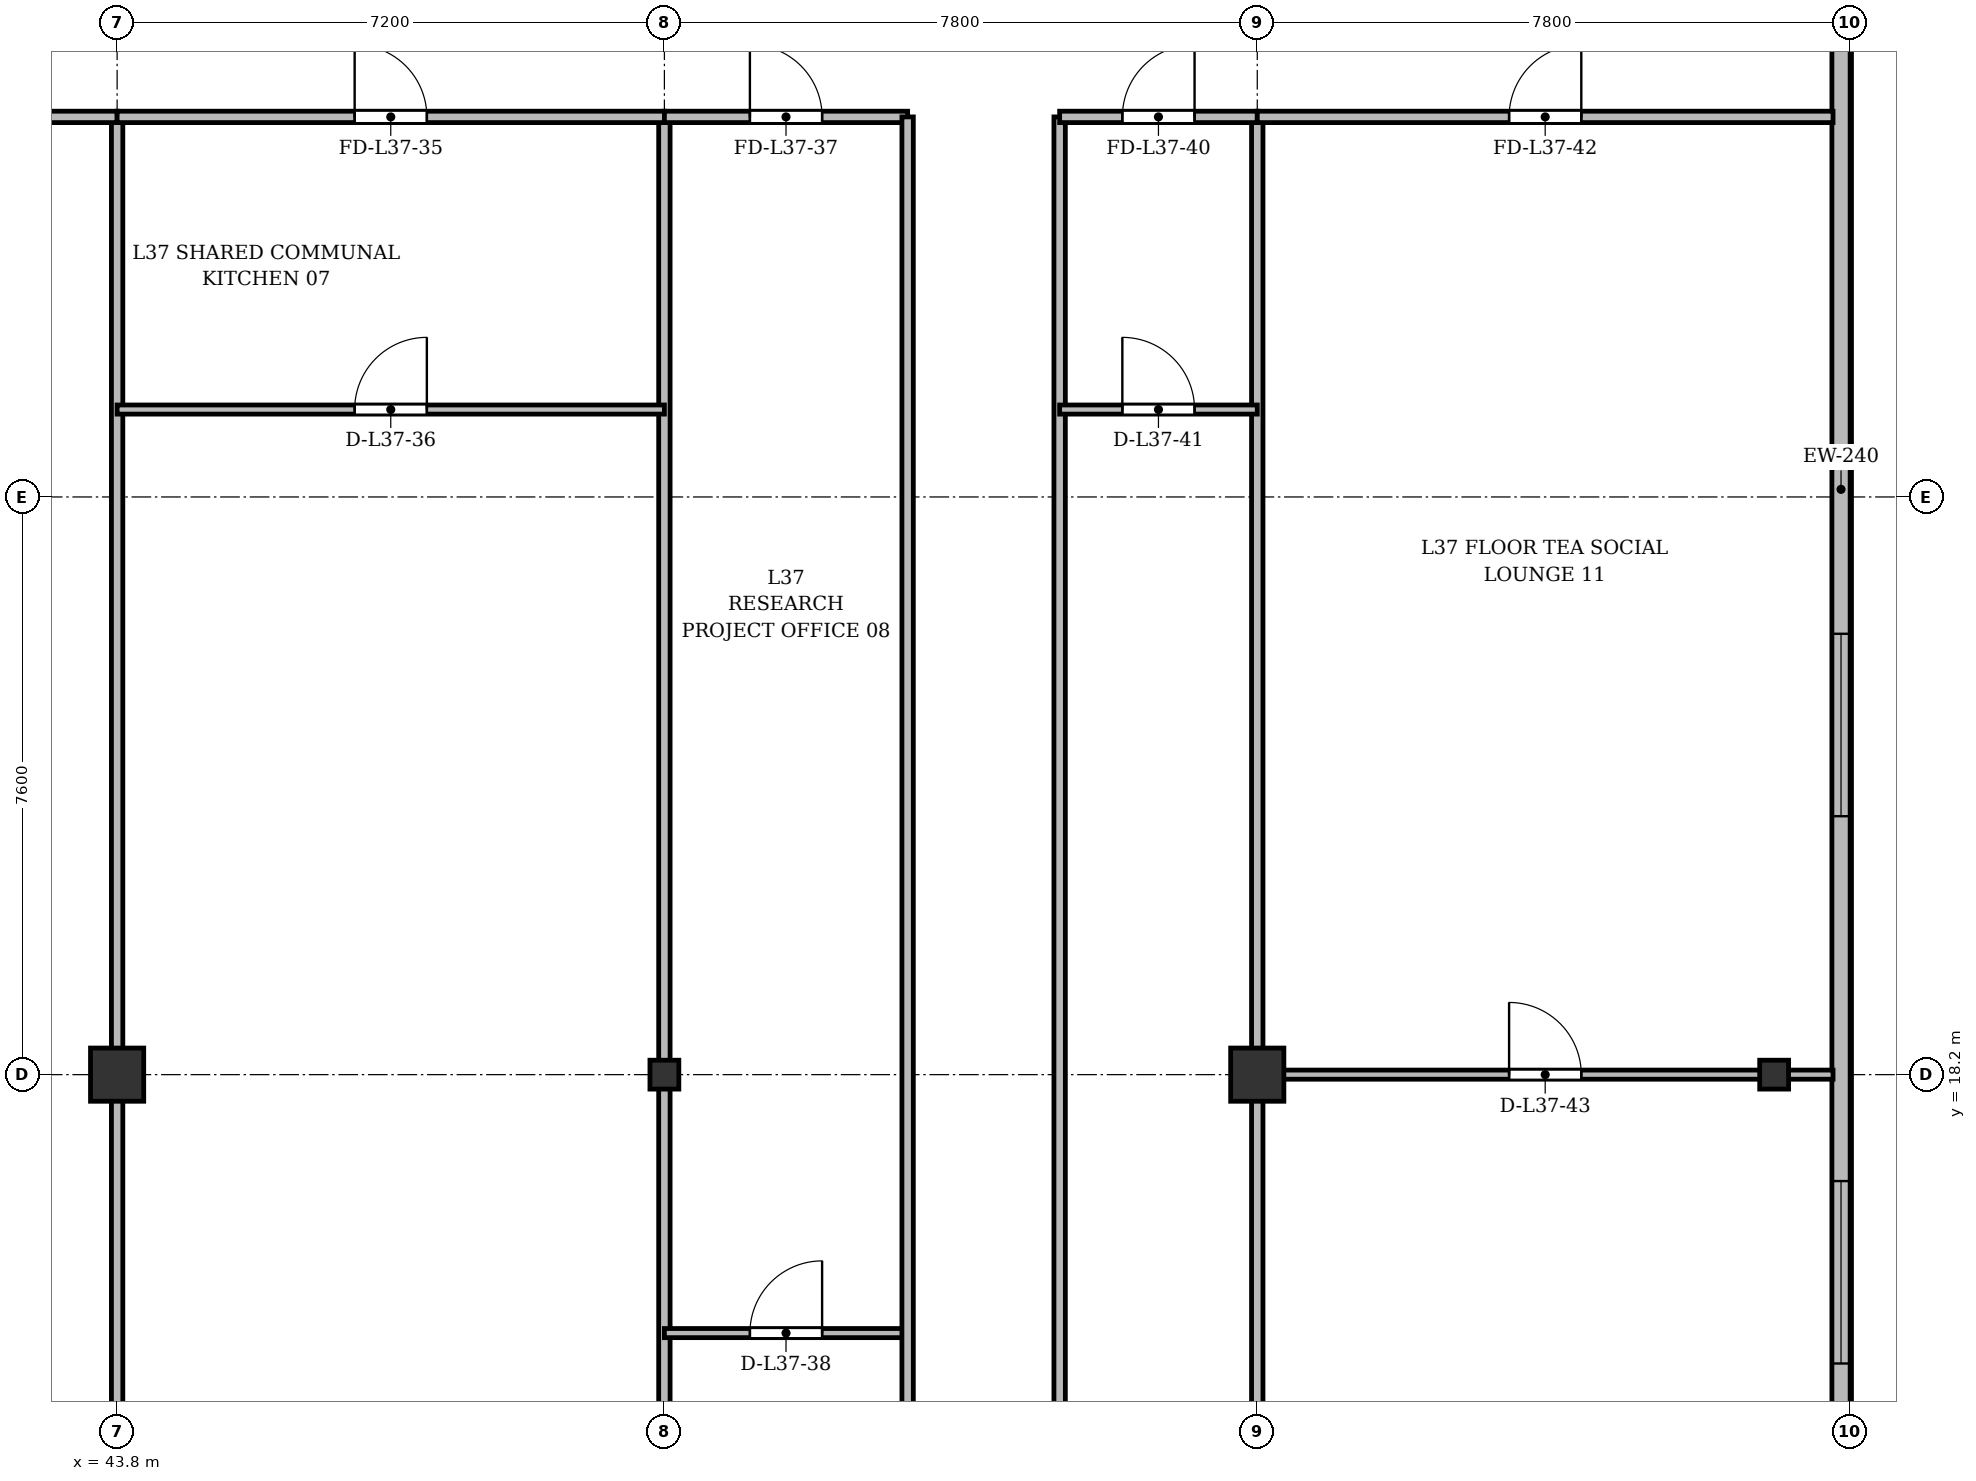
"""IFC4 building model, lengths in metres.
Left out: names, types, materials, properties, quantities, classifications, styles, units other than length and angle.
Written with IfcOpenShell. Run it as: python <this file> out.ifc"""

import sys

from ifc_helpers import new_model, si_unit, direction, frame, frame_2d, origin, origin_2d, place, context, subcontext, project, spatial, rectangle, i_section, extrude, source, transform, mapped, element, fill, save


model = new_model("IFC4")
c1 = context("Model", 3, precision=1e-05, world=origin(), true_north=direction((0.0, 1.0)))
c2 = subcontext(c1, "Body", "Model", "MODEL_VIEW")
j1 = project(units=[si_unit("LENGTHUNIT", "METRE"), si_unit("PLANEANGLEUNIT", "RADIAN")], contexts=[c1])
p1 = place(None, origin())
s1 = spatial("IfcSite", under=j1, at=p1, CompositionType="ELEMENT")
p2 = place(p1, origin())
s2 = spatial("IfcBuilding", under=s1, at=p2, CompositionType="ELEMENT")
p3 = place(p2, frame((0.0, 0.0, 142.9)))
s3 = spatial("IfcBuildingStorey", under=s2, at=p3, CompositionType="ELEMENT", Elevation=142.9)
m1 = source(origin(), c2, "Body", "SweptSolid", [
    extrude(rectangle(XDim=0.7, YDim=0.7, at=origin_2d()), origin(), (0.0, 0.0, 1.0), 3.6),
])
p4 = place(p3, frame((43.8, 18.2, 0.0), z_axis=(0.0, 0.0, 1.0), x_axis=(1.0, 0.0, 0.0)))
e1 = element("IfcColumn", 1, at=p4, inside=s3, PredefinedType="COLUMN", context=c2, shape_type="MappedRepresentation", body=[
    mapped(m1, transform((0.0, 0.0, 0.0), x_axis=(1.0, 0.0, 0.0), y_axis=(0.0, 1.0, 0.0), z_axis=(0.0, 0.0, 1.0), scale=1.0)),
])
m2 = source(origin(), c2, "Body", "SweptSolid", [
    extrude(i_section(OverallWidth=0.38, OverallDepth=0.38, WebThickness=0.02, FlangeThickness=0.03, at=origin_2d()), origin(), (0.0, 0.0, 1.0), 3.6),
])
p5 = place(p3, frame((51.0, 18.2, 0.0), z_axis=(0.0, 0.0, 1.0), x_axis=(1.0, 0.0, 0.0)))
e2 = element("IfcColumn", 2, at=p5, inside=s3, PredefinedType="COLUMN", context=c2, shape_type="MappedRepresentation", body=[
    mapped(m2, transform((0.0, 0.0, 0.0), x_axis=(1.0, 0.0, 0.0), y_axis=(0.0, 1.0, 0.0), z_axis=(0.0, 0.0, 1.0), scale=1.0)),
])
p6 = place(p3, frame((58.8, 18.2, 0.0), z_axis=(0.0, 0.0, 1.0), x_axis=(1.0, 0.0, 0.0)))
e3 = element("IfcColumn", 3, at=p6, inside=s3, PredefinedType="COLUMN", context=c2, shape_type="MappedRepresentation", body=[
    mapped(m1, transform((0.0, 0.0, 0.0), x_axis=(1.0, 0.0, 0.0), y_axis=(0.0, 1.0, 0.0), z_axis=(0.0, 0.0, 1.0), scale=1.0)),
])
p7 = place(p3, frame((65.6, 18.2, 0.0), z_axis=(0.0, 0.0, 1.0), x_axis=(1.0, 0.0, 0.0)))
e4 = element("IfcColumn", 4, at=p7, inside=s3, PredefinedType="COLUMN", context=c2, shape_type="MappedRepresentation", body=[
    mapped(m2, transform((0.0, 0.0, 0.0), x_axis=(1.0, 0.0, 0.0), y_axis=(0.0, 1.0, 0.0), z_axis=(0.0, 0.0, 1.0), scale=1.0)),
])
p8 = place(p3, frame((66.48, 45.5, 0.0), z_axis=(0.0, 0.0, 1.0), x_axis=(0.0, -1.0, 0.0)))
e5 = element("IfcWall", 5, at=p8, inside=s3, PredefinedType="SOLIDWALL", context=c2, shape_type="SweptSolid", body=[
    extrude(rectangle(XDim=39.2, YDim=0.24, at=frame_2d((19.6, 0.0))), origin(), (0.0, 0.0, 1.0), 3.35),
])
p9 = place(p8, frame((36.55, 0.0, 0.92)))
e6 = element("IfcOpeningElement", 6, at=p9, cuts=e5, PredefinedType="OPENING", context=c2, shape_type="SweptSolid", body=[
    extrude(rectangle(XDim=1.2, YDim=1.65, at=frame_2d((0.6, 0.825))), frame((0.0, 0.13, 0.0), z_axis=(0.0, -1.0, 0.0), x_axis=(1.0, 0.0, 0.0)), (0.0, 0.0, 1.0), 0.26),
])
p10 = place(p8, frame((32.9, 0.0, 0.92)))
e7 = element("IfcOpeningElement", 7, at=p10, cuts=e5, PredefinedType="OPENING", context=c2, shape_type="SweptSolid", body=[
    extrude(rectangle(XDim=2.4, YDim=2.1, at=frame_2d((1.2, 1.05))), frame((0.0, 0.13, 0.0), z_axis=(0.0, -1.0, 0.0), x_axis=(1.0, 0.0, 0.0)), (0.0, 0.0, 1.0), 0.26),
])
p11 = place(p8, frame((28.7, 0.0, 0.92)))
e8 = element("IfcOpeningElement", 8, at=p11, cuts=e5, PredefinedType="OPENING", context=c2, shape_type="SweptSolid", body=[
    extrude(rectangle(XDim=2.4, YDim=2.1, at=frame_2d((1.2, 1.05))), frame((0.0, 0.13, 0.0), z_axis=(0.0, -1.0, 0.0), x_axis=(1.0, 0.0, 0.0)), (0.0, 0.0, 1.0), 0.26),
])
p12 = place(p8, frame((21.5, 0.0, 0.92)))
e9 = element("IfcOpeningElement", 9, at=p12, cuts=e5, PredefinedType="OPENING", context=c2, shape_type="SweptSolid", body=[
    extrude(rectangle(XDim=2.4, YDim=2.1, at=frame_2d((1.2, 1.05))), frame((0.0, 0.13, 0.0), z_axis=(0.0, -1.0, 0.0), x_axis=(1.0, 0.0, 0.0)), (0.0, 0.0, 1.0), 0.26),
])
p13 = place(p8, frame((7.5, 0.0, 0.92)))
e10 = element("IfcOpeningElement", 10, at=p13, cuts=e5, PredefinedType="OPENING", context=c2, shape_type="SweptSolid", body=[
    extrude(rectangle(XDim=2.4, YDim=2.1, at=frame_2d((1.2, 1.05))), frame((0.0, 0.13, 0.0), z_axis=(0.0, -1.0, 0.0), x_axis=(1.0, 0.0, 0.0)), (0.0, 0.0, 1.0), 0.26),
])
p14 = place(p8, frame((4.5, 0.0, 0.92)))
e11 = element("IfcOpeningElement", 11, at=p14, cuts=e5, PredefinedType="OPENING", context=c2, shape_type="SweptSolid", body=[
    extrude(rectangle(XDim=1.2, YDim=1.65, at=frame_2d((0.6, 0.825))), frame((0.0, 0.13, 0.0), z_axis=(0.0, -1.0, 0.0), x_axis=(1.0, 0.0, 0.0)), (0.0, 0.0, 1.0), 0.26),
])
p15 = place(p8, frame((1.15, 0.0, 0.92)))
e12 = element("IfcOpeningElement", 12, at=p15, cuts=e5, PredefinedType="OPENING", context=c2, shape_type="SweptSolid", body=[
    extrude(rectangle(XDim=1.2, YDim=1.65, at=frame_2d((0.6, 0.825))), frame((0.0, 0.13, 0.0), z_axis=(0.0, -1.0, 0.0), x_axis=(1.0, 0.0, 0.0)), (0.0, 0.0, 1.0), 0.26),
])
for number, where, z_axis, x_axis in (
    (13, (43.8, 3.525, 0.0), (0.0, 0.0, 1.0), (0.0, 1.0, 0.0)),
    (14, (51.0, 3.525, 0.0), (0.0, 0.0, 1.0), (0.0, 1.0, 0.0)),
    (15, (58.8, 3.525, 0.0), (0.0, 0.0, 1.0), (0.0, 1.0, 0.0)),
):
    element("IfcWall", number, at=place(p3, frame(where, z_axis=z_axis, x_axis=x_axis)), inside=s3, PredefinedType="PARTITIONING", context=c2, shape_type="SweptSolid", body=[
        extrude(rectangle(XDim=27.275, YDim=0.15, at=frame_2d((13.638, 0.0))), origin(), (0.0, 0.0, 1.0), 2.85),
    ])
p16 = place(p3, frame((30.6, 30.8, 0.0), z_axis=(0.0, 0.0, 1.0), x_axis=(1.0, 0.0, 0.0)))
e16 = element("IfcWall", 16, at=p16, inside=s3, PredefinedType="PARTITIONING", context=c2, shape_type="SweptSolid", body=[
    extrude(rectangle(XDim=13.2, YDim=0.15, at=frame_2d((6.6, 0.0))), origin(), (0.0, 0.0, 1.0), 2.85),
])
p17 = place(p16, frame((5.8, 0.0, 0.0)))
e17 = element("IfcOpeningElement", 17, at=p17, cuts=e16, PredefinedType="OPENING", context=c2, shape_type="SweptSolid", body=[
    extrude(rectangle(XDim=1.6, YDim=2.2, at=frame_2d((0.8, 1.1))), frame((0.0, 0.085, 0.0), z_axis=(0.0, -1.0, 0.0), x_axis=(1.0, 0.0, 0.0)), (0.0, 0.0, 1.0), 0.17),
])
p18 = place(p3, frame((43.8, 30.8, 0.0), z_axis=(0.0, 0.0, 1.0), x_axis=(1.0, 0.0, 0.0)))
e18 = element("IfcWall", 18, at=p18, inside=s3, PredefinedType="PARTITIONING", context=c2, shape_type="SweptSolid", body=[
    extrude(rectangle(XDim=7.2, YDim=0.15, at=frame_2d((3.6, 0.0))), origin(), (0.0, 0.0, 1.0), 2.85),
])
p19 = place(p18, frame((3.125, 0.0, 0.0)))
e19 = element("IfcOpeningElement", 19, at=p19, cuts=e18, PredefinedType="OPENING", context=c2, shape_type="SweptSolid", body=[
    extrude(rectangle(XDim=0.95, YDim=2.15, at=frame_2d((0.475, 1.075))), frame((0.0, 0.085, 0.0), z_axis=(0.0, -1.0, 0.0), x_axis=(1.0, 0.0, 0.0)), (0.0, 0.0, 1.0), 0.17),
])
p20 = place(p3, frame((43.8, 26.95, 0.0), z_axis=(0.0, 0.0, 1.0), x_axis=(1.0, 0.0, 0.0)))
e20 = element("IfcWall", 20, at=p20, inside=s3, PredefinedType="PARTITIONING", context=c2, shape_type="SweptSolid", body=[
    extrude(rectangle(XDim=7.2, YDim=0.12, at=frame_2d((3.6, 0.0))), origin(), (0.0, 0.0, 1.0), 2.85),
])
p21 = place(p20, frame((3.125, 0.0, 0.0)))
e21 = element("IfcOpeningElement", 21, at=p21, cuts=e20, PredefinedType="OPENING", context=c2, shape_type="SweptSolid", body=[
    extrude(rectangle(XDim=0.95, YDim=2.15, at=frame_2d((0.475, 1.075))), frame((0.0, 0.07, 0.0), z_axis=(0.0, -1.0, 0.0), x_axis=(1.0, 0.0, 0.0)), (0.0, 0.0, 1.0), 0.14),
])
p22 = place(p3, frame((51.0, 30.8, 0.0), z_axis=(0.0, 0.0, 1.0), x_axis=(1.0, 0.0, 0.0)))
e22 = element("IfcWall", 22, at=p22, inside=s3, PredefinedType="PARTITIONING", context=c2, shape_type="SweptSolid", body=[
    extrude(rectangle(XDim=3.2, YDim=0.15, at=frame_2d((1.6, 0.0))), origin(), (0.0, 0.0, 1.0), 2.85),
])
p23 = place(p22, frame((1.125, 0.0, 0.0)))
e23 = element("IfcOpeningElement", 23, at=p23, cuts=e22, PredefinedType="OPENING", context=c2, shape_type="SweptSolid", body=[
    extrude(rectangle(XDim=0.95, YDim=2.15, at=frame_2d((0.475, 1.075))), frame((0.0, 0.085, 0.0), z_axis=(0.0, -1.0, 0.0), x_axis=(1.0, 0.0, 0.0)), (0.0, 0.0, 1.0), 0.17),
])
p24 = place(p3, frame((51.0, 14.8, 0.0), z_axis=(0.0, 0.0, 1.0), x_axis=(1.0, 0.0, 0.0)))
e24 = element("IfcWall", 24, at=p24, inside=s3, PredefinedType="PARTITIONING", context=c2, shape_type="SweptSolid", body=[
    extrude(rectangle(XDim=3.2, YDim=0.12, at=frame_2d((1.6, 0.0))), origin(), (0.0, 0.0, 1.0), 2.85),
])
p25 = place(p24, frame((1.125, 0.0, 0.0)))
e25 = element("IfcOpeningElement", 25, at=p25, cuts=e24, PredefinedType="OPENING", context=c2, shape_type="SweptSolid", body=[
    extrude(rectangle(XDim=0.95, YDim=2.15, at=frame_2d((0.475, 1.075))), frame((0.0, 0.07, 0.0), z_axis=(0.0, -1.0, 0.0), x_axis=(1.0, 0.0, 0.0)), (0.0, 0.0, 1.0), 0.14),
])
for number, where, z_axis, x_axis in (
    (26, (54.2, 3.525, 0.0), (0.0, 0.0, 1.0), (0.0, 1.0, 0.0)),
    (27, (56.2, 3.525, 0.0), (0.0, 0.0, 1.0), (0.0, 1.0, 0.0)),
):
    element("IfcWall", number, at=place(p3, frame(where, z_axis=z_axis, x_axis=x_axis)), inside=s3, PredefinedType="PARTITIONING", context=c2, shape_type="SweptSolid", body=[
        extrude(rectangle(XDim=27.275, YDim=0.15, at=frame_2d((13.638, 0.0))), origin(), (0.0, 0.0, 1.0), 2.75),
    ])
p26 = place(p3, frame((56.2, 30.8, 0.0), z_axis=(0.0, 0.0, 1.0), x_axis=(1.0, 0.0, 0.0)))
e28 = element("IfcWall", 28, at=p26, inside=s3, PredefinedType="PARTITIONING", context=c2, shape_type="SweptSolid", body=[
    extrude(rectangle(XDim=2.6, YDim=0.15, at=frame_2d((1.3, 0.0))), origin(), (0.0, 0.0, 1.0), 2.85),
])
p27 = place(p26, frame((0.825, 0.0, 0.0)))
e29 = element("IfcOpeningElement", 29, at=p27, cuts=e28, PredefinedType="OPENING", context=c2, shape_type="SweptSolid", body=[
    extrude(rectangle(XDim=0.95, YDim=2.15, at=frame_2d((0.475, 1.075))), frame((0.0, 0.085, 0.0), z_axis=(0.0, -1.0, 0.0), x_axis=(1.0, 0.0, 0.0)), (0.0, 0.0, 1.0), 0.17),
])
p28 = place(p3, frame((56.2, 26.95, 0.0), z_axis=(0.0, 0.0, 1.0), x_axis=(1.0, 0.0, 0.0)))
e30 = element("IfcWall", 30, at=p28, inside=s3, PredefinedType="PARTITIONING", context=c2, shape_type="SweptSolid", body=[
    extrude(rectangle(XDim=2.6, YDim=0.12, at=frame_2d((1.3, 0.0))), origin(), (0.0, 0.0, 1.0), 2.85),
])
p29 = place(p28, frame((0.825, 0.0, 0.0)))
e31 = element("IfcOpeningElement", 31, at=p29, cuts=e30, PredefinedType="OPENING", context=c2, shape_type="SweptSolid", body=[
    extrude(rectangle(XDim=0.95, YDim=2.15, at=frame_2d((0.475, 1.075))), frame((0.0, 0.07, 0.0), z_axis=(0.0, -1.0, 0.0), x_axis=(1.0, 0.0, 0.0)), (0.0, 0.0, 1.0), 0.14),
])
p30 = place(p3, frame((58.8, 30.8, 0.0), z_axis=(0.0, 0.0, 1.0), x_axis=(1.0, 0.0, 0.0)))
e32 = element("IfcWall", 32, at=p30, inside=s3, PredefinedType="PARTITIONING", context=c2, shape_type="SweptSolid", body=[
    extrude(rectangle(XDim=7.575, YDim=0.15, at=frame_2d((3.788, 0.0))), origin(), (0.0, 0.0, 1.0), 2.85),
])
p31 = place(p30, frame((3.313, 0.0, 0.0)))
e33 = element("IfcOpeningElement", 33, at=p31, cuts=e32, PredefinedType="OPENING", context=c2, shape_type="SweptSolid", body=[
    extrude(rectangle(XDim=0.95, YDim=2.15, at=frame_2d((0.475, 1.075))), frame((0.0, 0.085, 0.0), z_axis=(0.0, -1.0, 0.0), x_axis=(1.0, 0.0, 0.0)), (0.0, 0.0, 1.0), 0.17),
])
p32 = place(p3, frame((58.8, 18.2, 0.0), z_axis=(0.0, 0.0, 1.0), x_axis=(1.0, 0.0, 0.0)))
e34 = element("IfcWall", 34, at=p32, inside=s3, PredefinedType="PARTITIONING", context=c2, shape_type="SweptSolid", body=[
    extrude(rectangle(XDim=7.575, YDim=0.12, at=frame_2d((3.788, 0.0))), origin(), (0.0, 0.0, 1.0), 2.75),
])
p33 = place(p32, frame((3.313, 0.0, 0.0)))
e35 = element("IfcOpeningElement", 35, at=p33, cuts=e34, PredefinedType="OPENING", context=c2, shape_type="SweptSolid", body=[
    extrude(rectangle(XDim=0.95, YDim=2.15, at=frame_2d((0.475, 1.075))), frame((0.0, 0.07, 0.0), z_axis=(0.0, -1.0, 0.0), x_axis=(1.0, 0.0, 0.0)), (0.0, 0.0, 1.0), 0.14),
])
m3 = source(origin(), c2, "Body", "SweptSolid", [
    extrude(rectangle(XDim=2.4, YDim=2.1, at=frame_2d((1.2, 1.05))), frame((0.0, 0.03, 0.0), z_axis=(0.0, -1.0, 0.0), x_axis=(1.0, 0.0, 0.0)), (0.0, 0.0, 1.0), 0.06),
])
p34 = place(p11, origin())
e36 = element("IfcWindow", 36, at=p34, inside=s3, PartitioningType="SINGLE_PANEL", PredefinedType="WINDOW", context=c2, shape_type="MappedRepresentation", body=[
    mapped(m3, transform((0.0, 0.0, 0.0), x_axis=(1.0, 0.0, 0.0), y_axis=(0.0, 1.0, 0.0), z_axis=(0.0, 0.0, 1.0), scale=1.0)),
])
fill(e8, e36)
p35 = place(p12, origin())
e37 = element("IfcWindow", 37, at=p35, inside=s3, PartitioningType="SINGLE_PANEL", PredefinedType="WINDOW", context=c2, shape_type="MappedRepresentation", body=[
    mapped(m3, transform((0.0, 0.0, 0.0), x_axis=(1.0, 0.0, 0.0), y_axis=(0.0, 1.0, 0.0), z_axis=(0.0, 0.0, 1.0), scale=1.0)),
])
fill(e9, e37)
m4 = source(origin(), c2, "Body", "SweptSolid", [
    extrude(rectangle(XDim=0.95, YDim=2.15, at=frame_2d((0.475, 1.075))), frame((0.0, 0.025, 0.0), z_axis=(0.0, -1.0, 0.0), x_axis=(1.0, 0.0, 0.0)), (0.0, 0.0, 1.0), 0.05),
])
p36 = place(p19, origin())
e38 = element("IfcDoor", 38, at=p36, inside=s3, OperationType="SINGLE_SWING_LEFT", PredefinedType="DOOR", context=c2, shape_type="MappedRepresentation", body=[
    mapped(m4, transform((0.0, 0.0, 0.0), x_axis=(1.0, 0.0, 0.0), y_axis=(0.0, 1.0, 0.0), z_axis=(0.0, 0.0, 1.0), scale=1.0)),
])
fill(e19, e38)
p37 = place(p21, origin())
e39 = element("IfcDoor", 39, at=p37, inside=s3, OperationType="SINGLE_SWING_RIGHT", PredefinedType="DOOR", context=c2, shape_type="MappedRepresentation", body=[
    mapped(m4, transform((0.0, 0.0, 0.0), x_axis=(1.0, 0.0, 0.0), y_axis=(0.0, 1.0, 0.0), z_axis=(0.0, 0.0, 1.0), scale=1.0)),
])
fill(e21, e39)
p38 = place(p23, origin())
e40 = element("IfcDoor", 40, at=p38, inside=s3, OperationType="SINGLE_SWING_LEFT", PredefinedType="DOOR", context=c2, shape_type="MappedRepresentation", body=[
    mapped(m4, transform((0.0, 0.0, 0.0), x_axis=(1.0, 0.0, 0.0), y_axis=(0.0, 1.0, 0.0), z_axis=(0.0, 0.0, 1.0), scale=1.0)),
])
fill(e23, e40)
p39 = place(p25, origin())
e41 = element("IfcDoor", 41, at=p39, inside=s3, OperationType="SINGLE_SWING_RIGHT", PredefinedType="DOOR", context=c2, shape_type="MappedRepresentation", body=[
    mapped(m4, transform((0.0, 0.0, 0.0), x_axis=(1.0, 0.0, 0.0), y_axis=(0.0, 1.0, 0.0), z_axis=(0.0, 0.0, 1.0), scale=1.0)),
])
fill(e25, e41)
p40 = place(p27, origin())
e42 = element("IfcDoor", 42, at=p40, inside=s3, OperationType="SINGLE_SWING_RIGHT", PredefinedType="DOOR", context=c2, shape_type="MappedRepresentation", body=[
    mapped(m4, transform((0.0, 0.0, 0.0), x_axis=(1.0, 0.0, 0.0), y_axis=(0.0, 1.0, 0.0), z_axis=(0.0, 0.0, 1.0), scale=1.0)),
])
fill(e29, e42)
p41 = place(p29, origin())
e43 = element("IfcDoor", 43, at=p41, inside=s3, OperationType="SINGLE_SWING_LEFT", PredefinedType="DOOR", context=c2, shape_type="MappedRepresentation", body=[
    mapped(m4, transform((0.0, 0.0, 0.0), x_axis=(1.0, 0.0, 0.0), y_axis=(0.0, 1.0, 0.0), z_axis=(0.0, 0.0, 1.0), scale=1.0)),
])
fill(e31, e43)
p42 = place(p31, origin())
e44 = element("IfcDoor", 44, at=p42, inside=s3, OperationType="SINGLE_SWING_RIGHT", PredefinedType="DOOR", context=c2, shape_type="MappedRepresentation", body=[
    mapped(m4, transform((0.0, 0.0, 0.0), x_axis=(1.0, 0.0, 0.0), y_axis=(0.0, 1.0, 0.0), z_axis=(0.0, 0.0, 1.0), scale=1.0)),
])
fill(e33, e44)
p43 = place(p33, origin())
e45 = element("IfcDoor", 45, at=p43, inside=s3, OperationType="SINGLE_SWING_LEFT", PredefinedType="DOOR", context=c2, shape_type="MappedRepresentation", body=[
    mapped(m4, transform((0.0, 0.0, 0.0), x_axis=(1.0, 0.0, 0.0), y_axis=(0.0, 1.0, 0.0), z_axis=(0.0, 0.0, 1.0), scale=1.0)),
])
fill(e35, e45)
save(model, sys.argv[1])
